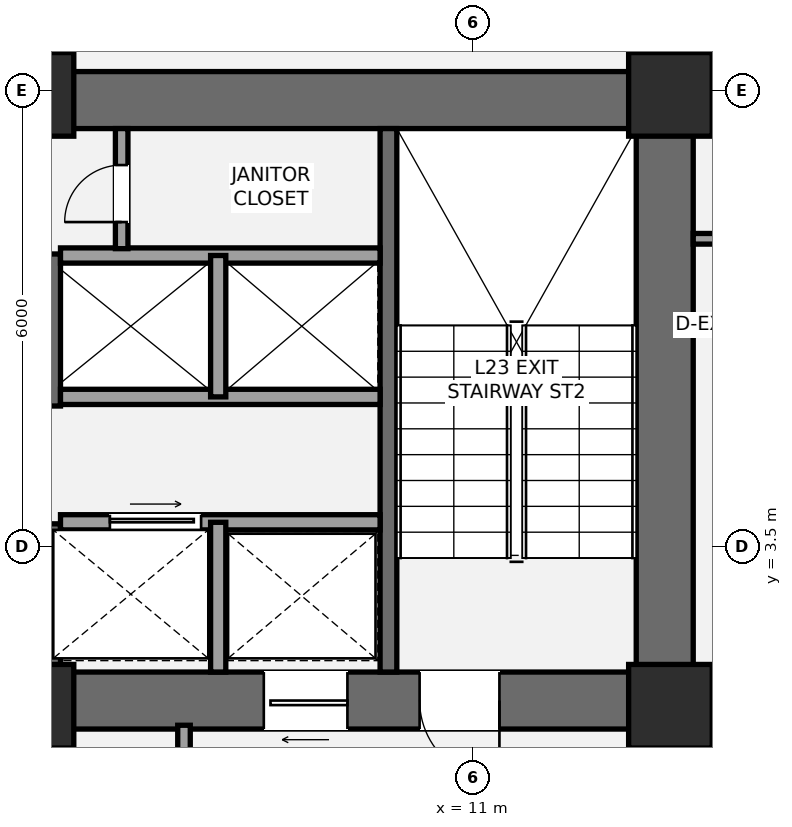
"""IFC4 building model, lengths in metres.
Left out: names, types, materials, properties, quantities, classifications, styles, units other than length and angle.
Written with IfcOpenShell. Run it as: python <this file> out.ifc"""

import sys

from ifc_helpers import new_model, si_unit, direction, frame, frame_2d, origin, origin_2d, place, context, subcontext, project, spatial, rectangle, extrude, element, fill, save


model = new_model("IFC4")
c1 = context("Model", 3, precision=1e-05, world=origin(), true_north=direction((0.0, 1.0)))
c2 = subcontext(c1, "Body", "Model", "MODEL_VIEW")
j1 = project(units=[si_unit("LENGTHUNIT", "METRE"), si_unit("PLANEANGLEUNIT", "RADIAN")], contexts=[c1])
p1 = place(None, origin())
s1 = spatial("IfcSite", under=j1, at=p1, CompositionType="ELEMENT")
p2 = place(p1, origin())
s2 = spatial("IfcBuilding", under=s1, at=p2, CompositionType="ELEMENT")
p3 = place(p2, frame((0.0, 0.0, 89.6)))
s3 = spatial("IfcBuildingStorey", under=s2, at=p3, CompositionType="ELEMENT", Elevation=89.6)
p4 = place(p3, frame((13.525, 1.1, 0.0), z_axis=(0.0, 0.0, 1.0), x_axis=(0.0, 1.0, 0.0)))
e1 = element("IfcWall", 1, at=p4, inside=s3, PredefinedType="SHEAR", context=c2, shape_type="SweptSolid", body=[
    extrude(rectangle(XDim=8.65, YDim=0.75, at=frame_2d((4.325, 0.0))), origin(), (0.0, 0.0, 1.0), 3.5),
])
p5 = place(p3, frame((4.425, 9.375, 0.0), z_axis=(0.0, 0.0, 1.0), x_axis=(1.0, 0.0, 0.0)))
e2 = element("IfcWall", 2, at=p5, inside=s3, PredefinedType="SHEAR", context=c2, shape_type="SweptSolid", body=[
    extrude(rectangle(XDim=9.475, YDim=0.75, at=frame_2d((4.737, 0.0))), origin(), (0.0, 0.0, 1.0), 3.5),
])
p6 = place(p3, frame((13.9, 1.475, 0.0), z_axis=(0.0, 0.0, 1.0), x_axis=(-1.0, 0.0, 0.0)))
e3 = element("IfcWall", 3, at=p6, inside=s3, PredefinedType="SHEAR", context=c2, shape_type="SweptSolid", body=[
    extrude(rectangle(XDim=9.075, YDim=0.75, at=frame_2d((4.538, 0.0))), origin(), (0.0, 0.0, 1.0), 3.5),
])
p7 = place(p6, frame((2.55, 0.0, 0.0)))
e4 = element("IfcOpeningElement", 4, at=p7, cuts=e3, PredefinedType="OPENING", context=c2, shape_type="SweptSolid", body=[
    extrude(rectangle(XDim=1.05, YDim=2.15, at=frame_2d((0.525, 1.075))), frame((0.0, 0.385, 0.0), z_axis=(0.0, -1.0, 0.0), x_axis=(1.0, 0.0, 0.0)), (0.0, 0.0, 1.0), 0.77),
])
p8 = place(p6, frame((4.55, 0.0, 0.0)))
e5 = element("IfcOpeningElement", 5, at=p8, cuts=e3, PredefinedType="OPENING", context=c2, shape_type="SweptSolid", body=[
    extrude(rectangle(XDim=1.1, YDim=2.2, at=frame_2d((0.55, 1.1))), frame((0.0, 0.385, 0.0), z_axis=(0.0, -1.0, 0.0), x_axis=(1.0, 0.0, 0.0)), (0.0, 0.0, 1.0), 0.77),
])
p9 = place(p3, frame((5.2, 1.1, 0.0), z_axis=(0.0, 0.0, 1.0), x_axis=(0.0, 1.0, 0.0)))
e6 = element("IfcWall", 6, at=p9, inside=s3, PredefinedType="SHEAR", context=c2, shape_type="SweptSolid", body=[
    extrude(rectangle(XDim=2.7, YDim=0.75, at=frame_2d((1.35, 0.0))), origin(), (0.0, 0.0, 1.0), 3.5),
])
p10 = place(p3, frame((5.2, 5.35, 0.0), z_axis=(0.0, 0.0, 1.0), x_axis=(0.0, 1.0, 0.0)))
e7 = element("IfcWall", 7, at=p10, inside=s3, PredefinedType="SHEAR", context=c2, shape_type="SweptSolid", body=[
    extrude(rectangle(XDim=2.0, YDim=0.75, at=frame_2d((1.0, 0.0))), origin(), (0.0, 0.0, 1.0), 3.5),
])
p11 = place(p3, frame((9.89, 1.85, 0.0), z_axis=(0.0, 0.0, 1.0), x_axis=(0.0, 1.0, 0.0)))
e8 = element("IfcWall", 8, at=p11, inside=s3, PredefinedType="SHEAR", context=c2, shape_type="SweptSolid", body=[
    extrude(rectangle(XDim=7.15, YDim=0.22, at=frame_2d((3.575, 0.0))), origin(), (0.0, 0.0, 1.0), 3.5),
])
for number, where, z_axis, x_axis in (
    (9, (5.2, 1.4, 0.0), (0.0, 0.0, 1.0), (1.0, 0.0, 0.0)),
    (10, (5.2, 9.45, 0.0), (0.0, 0.0, 1.0), (1.0, 0.0, 0.0)),
    (11, (13.6, 1.4, 0.0), (0.0, 0.0, 1.0), (1.0, 0.0, 0.0)),
    (12, (13.6, 9.45, 0.0), (0.0, 0.0, 1.0), (1.0, 0.0, 0.0)),
):
    element("IfcColumn", number, at=place(p3, frame(where, z_axis=z_axis, x_axis=x_axis)), inside=s3, PredefinedType="COLUMN", context=c2, shape_type="SweptSolid", body=[
        extrude(rectangle(XDim=1.1, YDim=1.1, at=origin_2d()), origin(), (0.0, 0.0, 1.0), 3.5),
    ])
p12 = place(p3, frame((7.2, -2.15, 0.0), z_axis=(0.0, 0.0, 1.0), x_axis=(0.0, 1.0, 0.0)))
e13 = element("IfcWall", 13, at=p12, inside=s3, PredefinedType="PARTITIONING", context=c2, shape_type="SweptSolid", body=[
    extrude(rectangle(XDim=3.3, YDim=0.165, at=frame_2d((1.65, 0.0))), origin(), (0.0, 0.0, 1.0), 2.763),
])
p13 = place(p3, frame((13.45, -2.15, 0.0), z_axis=(0.0, 0.0, 1.0), x_axis=(0.0, 1.0, 0.0)))
e14 = element("IfcWall", 14, at=p13, inside=s3, PredefinedType="PARTITIONING", context=c2, shape_type="SweptSolid", body=[
    extrude(rectangle(XDim=3.3, YDim=0.165, at=frame_2d((1.65, 0.0))), origin(), (0.0, 0.0, 1.0), 2.763),
])
p14 = place(p13, frame((1.15, 0.0, 0.0)))
e15 = element("IfcOpeningElement", 15, at=p14, cuts=e14, PredefinedType="OPENING", context=c2, shape_type="SweptSolid", body=[
    extrude(rectangle(XDim=1.05, YDim=2.15, at=frame_2d((0.525, 1.075))), frame((0.0, 0.093, 0.0), z_axis=(0.0, -1.0, 0.0), x_axis=(1.0, 0.0, 0.0)), (0.0, 0.0, 1.0), 0.185),
])
p15 = place(p3, frame((5.575, 3.82, 0.0), z_axis=(0.0, 0.0, 1.0), x_axis=(1.0, 0.0, 0.0)))
e16 = element("IfcWall", 16, at=p15, inside=s3, PredefinedType="SOLIDWALL", context=c2, shape_type="SweptSolid", body=[
    extrude(rectangle(XDim=4.205, YDim=0.2, at=frame_2d((2.103, 0.0))), origin(), (0.0, 0.0, 1.0), 3.31),
])
p16 = place(p15, frame((0.65, 0.0, 0.0)))
e17 = element("IfcOpeningElement", 17, at=p16, cuts=e16, PredefinedType="OPENING", context=c2, shape_type="SweptSolid", body=[
    extrude(rectangle(XDim=1.2, YDim=2.2, at=frame_2d((0.6, 1.1))), frame((0.0, 0.11, 0.0), z_axis=(0.0, -1.0, 0.0), x_axis=(1.0, 0.0, 0.0)), (0.0, 0.0, 1.0), 0.22),
])
p17 = place(p3, frame((7.65, 1.85, 0.0), z_axis=(0.0, 0.0, 1.0), x_axis=(0.0, 1.0, 0.0)))
e18 = element("IfcWall", 18, at=p17, inside=s3, PredefinedType="SOLIDWALL", context=c2, shape_type="SweptSolid", body=[
    extrude(rectangle(XDim=1.97, YDim=0.2, at=frame_2d((0.985, 0.0))), origin(), (0.0, 0.0, 1.0), 3.31),
])
for number, where, z_axis, x_axis in (
    (19, (5.575, 5.47, 0.0), (0.0, 0.0, 1.0), (1.0, 0.0, 0.0)),
    (20, (5.575, 7.33, 0.0), (0.0, 0.0, 1.0), (1.0, 0.0, 0.0)),
):
    element("IfcWall", number, at=place(p3, frame(where, z_axis=z_axis, x_axis=x_axis)), inside=s3, PredefinedType="SOLIDWALL", context=c2, shape_type="SweptSolid", body=[
        extrude(rectangle(XDim=4.205, YDim=0.2, at=frame_2d((2.103, 0.0))), origin(), (0.0, 0.0, 1.0), 3.31),
    ])
p18 = place(p3, frame((7.65, 5.47, 0.0), z_axis=(0.0, 0.0, 1.0), x_axis=(0.0, 1.0, 0.0)))
e21 = element("IfcWall", 21, at=p18, inside=s3, PredefinedType="SOLIDWALL", context=c2, shape_type="SweptSolid", body=[
    extrude(rectangle(XDim=1.86, YDim=0.2, at=frame_2d((0.93, 0.0))), origin(), (0.0, 0.0, 1.0), 3.31),
])
p19 = place(p3, frame((6.38, 7.42, 0.0), z_axis=(0.0, 0.0, 1.0), x_axis=(0.0, 1.0, 0.0)))
e22 = element("IfcWall", 22, at=p19, inside=s3, PredefinedType="PARTITIONING", context=c2, shape_type="SweptSolid", body=[
    extrude(rectangle(XDim=1.58, YDim=0.165, at=frame_2d((0.79, 0.0))), origin(), (0.0, 0.0, 1.0), 3.31),
])
p20 = place(p19, frame((0.35, 0.0, 0.0)))
e23 = element("IfcOpeningElement", 23, at=p20, cuts=e22, PredefinedType="OPENING", context=c2, shape_type="SweptSolid", body=[
    extrude(rectangle(XDim=0.75, YDim=2.1, at=frame_2d((0.375, 1.05))), frame((0.0, 0.093, 0.0), z_axis=(0.0, -1.0, 0.0), x_axis=(1.0, 0.0, 0.0)), (0.0, 0.0, 1.0), 0.185),
])
p21 = place(p3, frame((13.9, 7.55, 0.0), z_axis=(0.0, 0.0, 1.0), x_axis=(1.0, 0.0, 0.0)))
e24 = element("IfcWall", 24, at=p21, inside=s3, PredefinedType="PARTITIONING", context=c2, shape_type="SweptSolid", body=[
    extrude(rectangle(XDim=2.3, YDim=0.14, at=frame_2d((1.15, 0.0))), origin(), (0.0, 0.0, 1.0), 2.763),
])
p22 = place(p21, frame((0.32, 0.0, 0.0)))
e25 = element("IfcOpeningElement", 25, at=p22, cuts=e24, PredefinedType="OPENING", context=c2, shape_type="SweptSolid", body=[
    extrude(rectangle(XDim=0.92, YDim=2.15, at=frame_2d((0.46, 1.075))), frame((0.0, 0.08, 0.0), z_axis=(0.0, -1.0, 0.0), x_axis=(1.0, 0.0, 0.0)), (0.0, 0.0, 1.0), 0.16),
])
p23 = place(p7, origin())
e26 = element("IfcDoor", 26, at=p23, inside=s3, OperationType="SINGLE_SWING_LEFT", PredefinedType="DOOR", context=c2, shape_type="SweptSolid", body=[
    extrude(rectangle(XDim=1.05, YDim=2.15, at=frame_2d((0.525, 1.075))), frame((0.0, 0.025, 0.0), z_axis=(0.0, -1.0, 0.0), x_axis=(1.0, 0.0, 0.0)), (0.0, 0.0, 1.0), 0.05),
])
fill(e4, e26)
p24 = place(p8, origin())
e27 = element("IfcDoor", 27, at=p24, inside=s3, OperationType="SLIDING_TO_LEFT", PredefinedType="DOOR", context=c2, shape_type="SweptSolid", body=[
    extrude(rectangle(XDim=1.1, YDim=2.2, at=frame_2d((0.55, 1.1))), frame((0.0, 0.025, 0.0), z_axis=(0.0, -1.0, 0.0), x_axis=(1.0, 0.0, 0.0)), (0.0, 0.0, 1.0), 0.05),
])
fill(e5, e27)
p25 = place(p16, origin())
e28 = element("IfcDoor", 28, at=p25, inside=s3, OperationType="SLIDING_TO_RIGHT", PredefinedType="DOOR", context=c2, shape_type="SweptSolid", body=[
    extrude(rectangle(XDim=1.2, YDim=2.2, at=frame_2d((0.6, 1.1))), frame((0.0, 0.025, 0.0), z_axis=(0.0, -1.0, 0.0), x_axis=(1.0, 0.0, 0.0)), (0.0, 0.0, 1.0), 0.05),
])
fill(e17, e28)
p26 = place(p20, origin())
e29 = element("IfcDoor", 29, at=p26, inside=s3, OperationType="SINGLE_SWING_LEFT", PredefinedType="DOOR", context=c2, shape_type="SweptSolid", body=[
    extrude(rectangle(XDim=0.75, YDim=2.1, at=frame_2d((0.375, 1.05))), frame((0.0, 0.025, 0.0), z_axis=(0.0, -1.0, 0.0), x_axis=(1.0, 0.0, 0.0)), (0.0, 0.0, 1.0), 0.05),
])
fill(e23, e29)
save(model, sys.argv[1])
